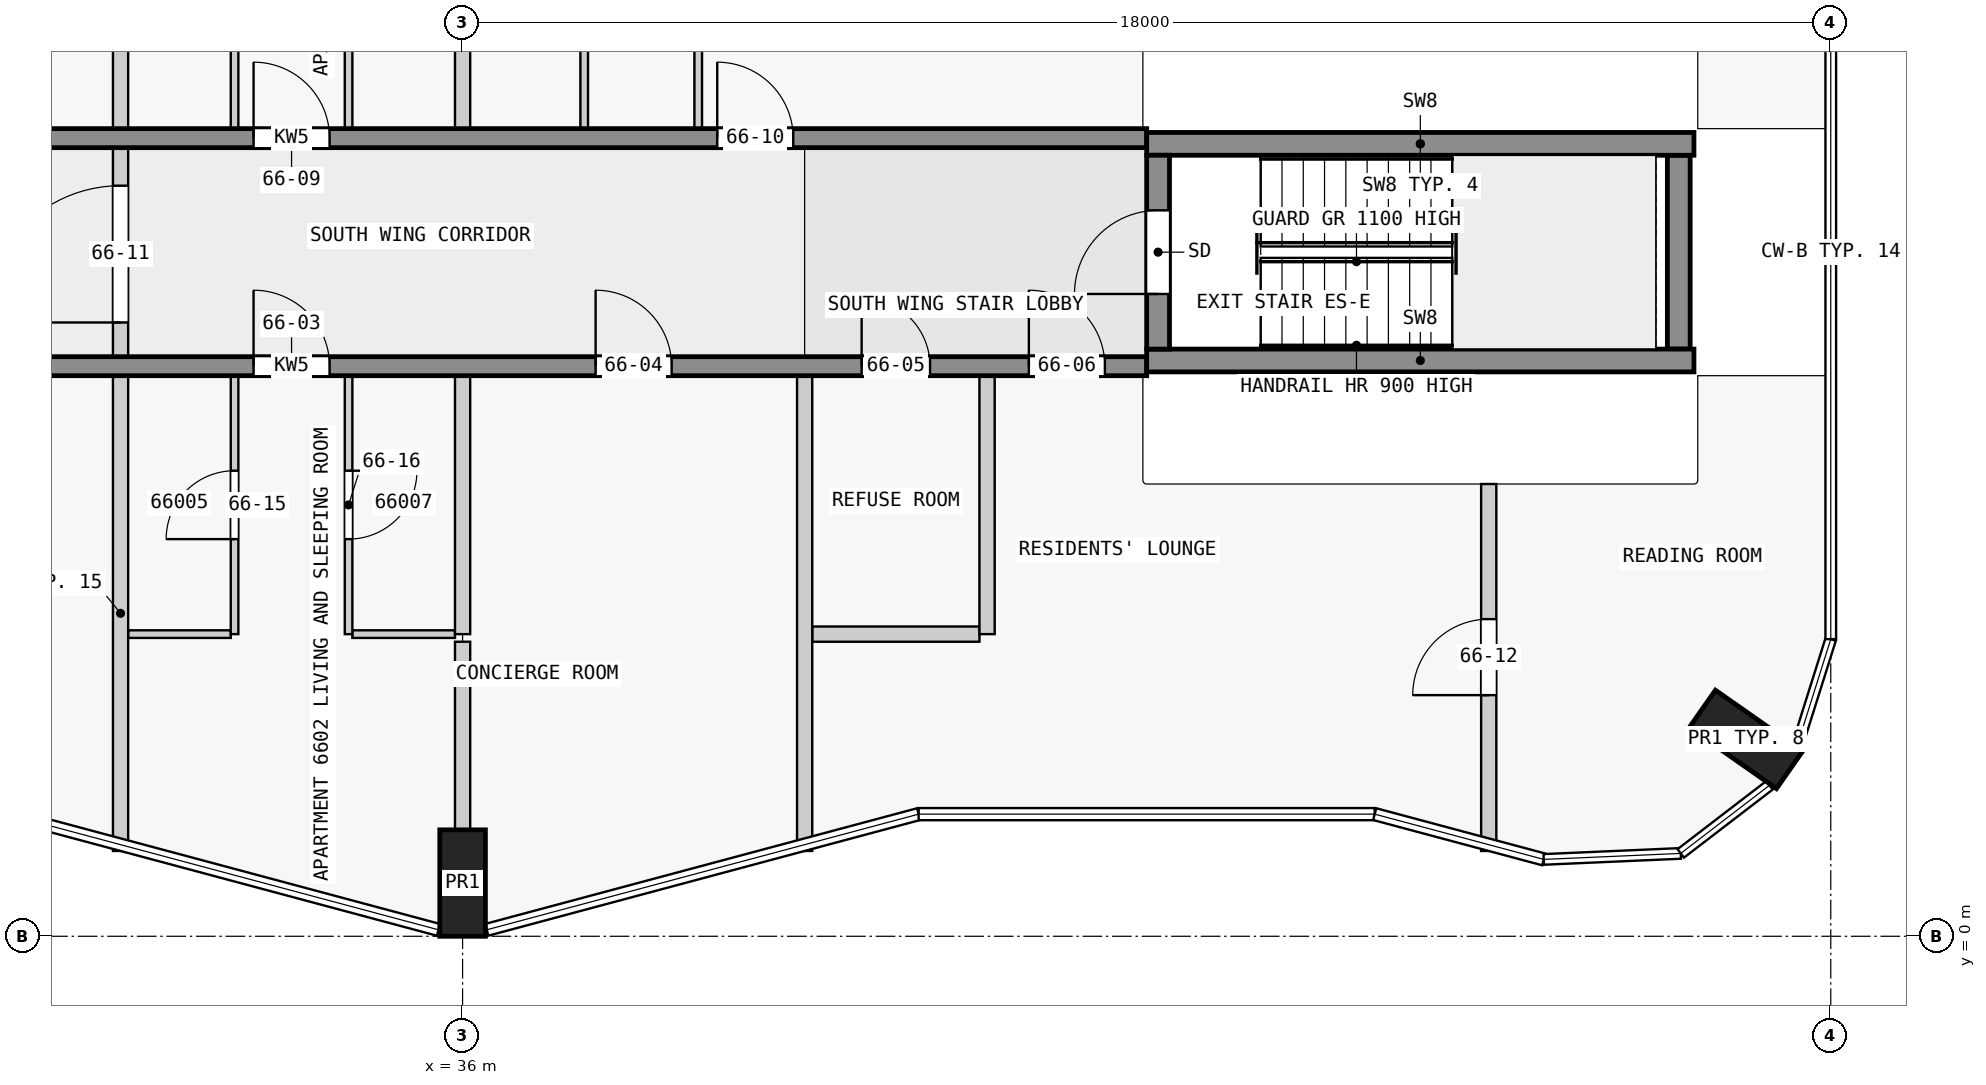
"""IFC4 building model, lengths in metres.
Left out: names, types, materials, properties, quantities, classifications, styles, units other than length and angle.
Written with IfcOpenShell. Run it as: python <this file> out.ifc"""

import sys

from ifc_helpers import new_model, si_unit, direction, frame, frame_2d, origin, origin_2d, place, context, subcontext, project, spatial, rectangle, extrude, element, fill, save


model = new_model("IFC4")
c1 = context("Model", 3, precision=1e-05, world=origin(), true_north=direction((0.0, 1.0)))
c2 = subcontext(c1, "Body", "Model", "MODEL_VIEW")
j1 = project(units=[si_unit("LENGTHUNIT", "METRE"), si_unit("PLANEANGLEUNIT", "RADIAN")], contexts=[c1])
p1 = place(None, origin())
s1 = spatial("IfcSite", under=j1, at=p1, CompositionType="ELEMENT")
p2 = place(p1, origin())
s2 = spatial("IfcBuilding", under=s1, at=p2, CompositionType="ELEMENT")
p3 = place(p2, frame((0.0, 0.0, 252.9)))
s3 = spatial("IfcBuildingStorey", under=s2, at=p3, CompositionType="ELEMENT", Elevation=252.9)
for number, where, z_axis, x_axis in (
    (1, (36.0, 0.7, 0.0), (0.0, 0.0, 1.0), (1.0, 0.0, 0.0)),
    (2, (52.884, 2.59, 0.0), (0.0, 0.0, 1.0), (0.574, 0.819, 0.0)),
):
    element("IfcColumn", number, at=place(p3, frame(where, z_axis=z_axis, x_axis=x_axis)), inside=s3, PredefinedType="COLUMN", context=c2, shape_type="SweptSolid", body=[
        extrude(rectangle(XDim=0.6, YDim=1.4, at=origin_2d()), origin(), (0.0, 0.0, 1.0), 3.5),
    ])
p4 = place(p3, frame((45.15, 7.725, 0.0), z_axis=(0.0, 0.0, 1.0), x_axis=(0.0, 1.0, 0.0)))
e3 = element("IfcWall", 3, at=p4, inside=s3, PredefinedType="SHEAR", context=c2, shape_type="SweptSolid", body=[
    extrude(rectangle(XDim=2.55, YDim=0.3, at=frame_2d((1.275, 0.0))), origin(), (0.0, 0.0, 1.0), 3.5),
])
p5 = place(p4, frame((0.725, 0.0, 0.0)))
e4 = element("IfcOpeningElement", 4, at=p5, cuts=e3, PredefinedType="OPENING", context=c2, shape_type="SweptSolid", body=[
    extrude(rectangle(XDim=1.1, YDim=2.1, at=frame_2d((0.55, 1.05))), frame((0.0, 0.16, 0.0), z_axis=(0.0, -1.0, 0.0), x_axis=(1.0, 0.0, 0.0)), (0.0, 0.0, 1.0), 0.32),
])
p6 = place(p3, frame((52.0, 7.725, 0.0), z_axis=(0.0, 0.0, 1.0), x_axis=(0.0, 1.0, 0.0)))
e5 = element("IfcWall", 5, at=p6, inside=s3, PredefinedType="SHEAR", context=c2, shape_type="SweptSolid", body=[
    extrude(rectangle(XDim=2.55, YDim=0.3, at=frame_2d((1.275, 0.0))), origin(), (0.0, 0.0, 1.0), 3.5),
])
for number, where, z_axis, x_axis in (
    (6, (45.0, 7.575, 0.0), (0.0, 0.0, 1.0), (1.0, 0.0, 0.0)),
    (7, (45.0, 10.425, 0.0), (0.0, 0.0, 1.0), (1.0, 0.0, 0.0)),
):
    element("IfcWall", number, at=place(p3, frame(where, z_axis=z_axis, x_axis=x_axis)), inside=s3, PredefinedType="SHEAR", context=c2, shape_type="SweptSolid", body=[
        extrude(rectangle(XDim=7.2, YDim=0.3, at=frame_2d((3.6, 0.0))), origin(), (0.0, 0.0, 1.0), 3.5),
    ])
p7 = place(p3, frame((22.5, 7.5, 0.0), z_axis=(0.0, 0.0, 1.0), x_axis=(1.0, 0.0, 0.0)))
e8 = element("IfcWall", 8, at=p7, inside=s3, PredefinedType="SHEAR", context=c2, shape_type="SweptSolid", body=[
    extrude(rectangle(XDim=22.5, YDim=0.25, at=frame_2d((11.25, 0.0))), origin(), (0.0, 0.0, 1.0), 3.25),
])
p8 = place(p7, frame((1.75, 0.0, 0.0)))
e9 = element("IfcOpeningElement", 9, at=p8, cuts=e8, PredefinedType="OPENING", context=c2, shape_type="SweptSolid", body=[
    extrude(rectangle(XDim=1.0, YDim=2.1, at=frame_2d((0.5, 1.05))), frame((0.0, 0.135, 0.0), z_axis=(0.0, -1.0, 0.0), x_axis=(1.0, 0.0, 0.0)), (0.0, 0.0, 1.0), 0.27),
])
p9 = place(p7, frame((5.85, 0.0, 0.0)))
e10 = element("IfcOpeningElement", 10, at=p9, cuts=e8, PredefinedType="OPENING", context=c2, shape_type="SweptSolid", body=[
    extrude(rectangle(XDim=1.8, YDim=2.1, at=frame_2d((0.9, 1.05))), frame((0.0, 0.135, 0.0), z_axis=(0.0, -1.0, 0.0), x_axis=(1.0, 0.0, 0.0)), (0.0, 0.0, 1.0), 0.27),
])
p10 = place(p7, frame((10.75, 0.0, 0.0)))
e11 = element("IfcOpeningElement", 11, at=p10, cuts=e8, PredefinedType="OPENING", context=c2, shape_type="SweptSolid", body=[
    extrude(rectangle(XDim=1.0, YDim=2.1, at=frame_2d((0.5, 1.05))), frame((0.0, 0.135, 0.0), z_axis=(0.0, -1.0, 0.0), x_axis=(1.0, 0.0, 0.0)), (0.0, 0.0, 1.0), 0.27),
])
p11 = place(p7, frame((15.25, 0.0, 0.0)))
e12 = element("IfcOpeningElement", 12, at=p11, cuts=e8, PredefinedType="OPENING", context=c2, shape_type="SweptSolid", body=[
    extrude(rectangle(XDim=1.0, YDim=2.1, at=frame_2d((0.5, 1.05))), frame((0.0, 0.135, 0.0), z_axis=(0.0, -1.0, 0.0), x_axis=(1.0, 0.0, 0.0)), (0.0, 0.0, 1.0), 0.27),
])
p12 = place(p7, frame((18.75, 0.0, 0.0)))
e13 = element("IfcOpeningElement", 13, at=p12, cuts=e8, PredefinedType="OPENING", context=c2, shape_type="SweptSolid", body=[
    extrude(rectangle(XDim=0.9, YDim=2.1, at=frame_2d((0.45, 1.05))), frame((0.0, 0.135, 0.0), z_axis=(0.0, -1.0, 0.0), x_axis=(1.0, 0.0, 0.0)), (0.0, 0.0, 1.0), 0.27),
])
p13 = place(p7, frame((20.95, 0.0, 0.0)))
e14 = element("IfcOpeningElement", 14, at=p13, cuts=e8, PredefinedType="OPENING", context=c2, shape_type="SweptSolid", body=[
    extrude(rectangle(XDim=1.0, YDim=2.1, at=frame_2d((0.5, 1.05))), frame((0.0, 0.135, 0.0), z_axis=(0.0, -1.0, 0.0), x_axis=(1.0, 0.0, 0.0)), (0.0, 0.0, 1.0), 0.27),
])
p14 = place(p3, frame((22.5, 10.5, 0.0), z_axis=(0.0, 0.0, 1.0), x_axis=(1.0, 0.0, 0.0)))
e15 = element("IfcWall", 15, at=p14, inside=s3, PredefinedType="SHEAR", context=c2, shape_type="SweptSolid", body=[
    extrude(rectangle(XDim=22.5, YDim=0.25, at=frame_2d((11.25, 0.0))), origin(), (0.0, 0.0, 1.0), 3.25),
])
p15 = place(p14, frame((1.75, 0.0, 0.0)))
e16 = element("IfcOpeningElement", 16, at=p15, cuts=e15, PredefinedType="OPENING", context=c2, shape_type="SweptSolid", body=[
    extrude(rectangle(XDim=1.0, YDim=2.1, at=frame_2d((0.5, 1.05))), frame((0.0, 0.135, 0.0), z_axis=(0.0, -1.0, 0.0), x_axis=(1.0, 0.0, 0.0)), (0.0, 0.0, 1.0), 0.27),
])
p16 = place(p14, frame((6.25, 0.0, 0.0)))
e17 = element("IfcOpeningElement", 17, at=p16, cuts=e15, PredefinedType="OPENING", context=c2, shape_type="SweptSolid", body=[
    extrude(rectangle(XDim=1.0, YDim=2.1, at=frame_2d((0.5, 1.05))), frame((0.0, 0.135, 0.0), z_axis=(0.0, -1.0, 0.0), x_axis=(1.0, 0.0, 0.0)), (0.0, 0.0, 1.0), 0.27),
])
p17 = place(p14, frame((10.75, 0.0, 0.0)))
e18 = element("IfcOpeningElement", 18, at=p17, cuts=e15, PredefinedType="OPENING", context=c2, shape_type="SweptSolid", body=[
    extrude(rectangle(XDim=1.0, YDim=2.1, at=frame_2d((0.5, 1.05))), frame((0.0, 0.135, 0.0), z_axis=(0.0, -1.0, 0.0), x_axis=(1.0, 0.0, 0.0)), (0.0, 0.0, 1.0), 0.27),
])
p18 = place(p14, frame((16.85, 0.0, 0.0)))
e19 = element("IfcOpeningElement", 19, at=p18, cuts=e15, PredefinedType="OPENING", context=c2, shape_type="SweptSolid", body=[
    extrude(rectangle(XDim=1.0, YDim=2.1, at=frame_2d((0.5, 1.05))), frame((0.0, 0.135, 0.0), z_axis=(0.0, -1.0, 0.0), x_axis=(1.0, 0.0, 0.0)), (0.0, 0.0, 1.0), 0.27),
])
for number, where, z_axis, x_axis in (
    (20, (31.6, 3.975, 0.0), (0.0, 0.0, 1.0), (1.0, 0.0, 0.0)),
    (21, (34.55, 3.975, 0.0), (0.0, 0.0, 1.0), (1.0, 0.0, 0.0)),
):
    element("IfcWall", number, at=place(p3, frame(where, z_axis=z_axis, x_axis=x_axis)), inside=s3, PredefinedType="PARTITIONING", context=c2, shape_type="SweptSolid", body=[
        extrude(rectangle(XDim=1.35, YDim=0.1, at=frame_2d((0.675, 0.0))), origin(), (0.0, 0.0, 1.0), 3.25),
    ])
p19 = place(p3, frame((40.6, 3.975, 0.0), z_axis=(0.0, 0.0, 1.0), x_axis=(1.0, 0.0, 0.0)))
e22 = element("IfcWall", 22, at=p19, inside=s3, PredefinedType="PARTITIONING", context=c2, shape_type="SweptSolid", body=[
    extrude(rectangle(XDim=2.2, YDim=0.2, at=frame_2d((1.1, 0.0))), origin(), (0.0, 0.0, 1.0), 3.25),
])
for number, where, z_axis, x_axis in (
    (23, (31.5, 1.122, 0.0), (0.0, 0.0, 1.0), (0.0, 1.0, 0.0)),
    (24, (31.5, 10.625, 0.0), (0.0, 0.0, 1.0), (0.0, 1.0, 0.0)),
):
    element("IfcWall", number, at=place(p3, frame(where, z_axis=z_axis, x_axis=x_axis)), inside=s3, PredefinedType="PARTITIONING", context=c2, shape_type="SweptSolid", body=[
        extrude(rectangle(XDim=6.253, YDim=0.2, at=frame_2d((3.126, 0.0))), origin(), (0.0, 0.0, 1.0), 3.25),
    ])
p20 = place(p3, frame((33.0, 3.975, 0.0), z_axis=(0.0, 0.0, 1.0), x_axis=(0.0, 1.0, 0.0)))
e25 = element("IfcWall", 25, at=p20, inside=s3, PredefinedType="PARTITIONING", context=c2, shape_type="SweptSolid", body=[
    extrude(rectangle(XDim=3.4, YDim=0.1, at=frame_2d((1.7, 0.0))), origin(), (0.0, 0.0, 1.0), 3.25),
])
p21 = place(p20, frame((1.25, 0.0, 0.0)))
e26 = element("IfcOpeningElement", 26, at=p21, cuts=e25, PredefinedType="OPENING", context=c2, shape_type="SweptSolid", body=[
    extrude(rectangle(XDim=0.9, YDim=2.1, at=frame_2d((0.45, 1.05))), frame((0.0, 0.06, 0.0), z_axis=(0.0, -1.0, 0.0), x_axis=(1.0, 0.0, 0.0)), (0.0, 0.0, 1.0), 0.12),
])
p22 = place(p3, frame((33.0, 10.625, 0.0), z_axis=(0.0, 0.0, 1.0), x_axis=(0.0, 1.0, 0.0)))
e27 = element("IfcWall", 27, at=p22, inside=s3, PredefinedType="PARTITIONING", context=c2, shape_type="SweptSolid", body=[
    extrude(rectangle(XDim=3.4, YDim=0.1, at=frame_2d((1.7, 0.0))), origin(), (0.0, 0.0, 1.0), 3.25),
])
p23 = place(p22, frame((1.25, 0.0, 0.0)))
e28 = element("IfcOpeningElement", 28, at=p23, cuts=e27, PredefinedType="OPENING", context=c2, shape_type="SweptSolid", body=[
    extrude(rectangle(XDim=0.9, YDim=2.1, at=frame_2d((0.45, 1.05))), frame((0.0, 0.06, 0.0), z_axis=(0.0, -1.0, 0.0), x_axis=(1.0, 0.0, 0.0)), (0.0, 0.0, 1.0), 0.12),
])
p24 = place(p3, frame((34.5, 7.375, 0.0), z_axis=(0.0, 0.0, 1.0), x_axis=(0.0, -1.0, 0.0)))
e29 = element("IfcWall", 29, at=p24, inside=s3, PredefinedType="PARTITIONING", context=c2, shape_type="SweptSolid", body=[
    extrude(rectangle(XDim=3.4, YDim=0.1, at=frame_2d((1.7, 0.0))), origin(), (0.0, 0.0, 1.0), 3.25),
])
p25 = place(p24, frame((1.25, 0.0, 0.0)))
e30 = element("IfcOpeningElement", 30, at=p25, cuts=e29, PredefinedType="OPENING", context=c2, shape_type="SweptSolid", body=[
    extrude(rectangle(XDim=0.9, YDim=2.1, at=frame_2d((0.45, 1.05))), frame((0.0, 0.06, 0.0), z_axis=(0.0, -1.0, 0.0), x_axis=(1.0, 0.0, 0.0)), (0.0, 0.0, 1.0), 0.12),
])
p26 = place(p3, frame((34.5, 13.975, 0.0), z_axis=(0.0, 0.0, 1.0), x_axis=(0.0, -1.0, 0.0)))
e31 = element("IfcWall", 31, at=p26, inside=s3, PredefinedType="PARTITIONING", context=c2, shape_type="SweptSolid", body=[
    extrude(rectangle(XDim=3.35, YDim=0.1, at=frame_2d((1.675, 0.0))), origin(), (0.0, 0.0, 1.0), 3.25),
])
p27 = place(p26, frame((1.25, 0.0, 0.0)))
e32 = element("IfcOpeningElement", 32, at=p27, cuts=e31, PredefinedType="OPENING", context=c2, shape_type="SweptSolid", body=[
    extrude(rectangle(XDim=0.9, YDim=2.1, at=frame_2d((0.45, 1.05))), frame((0.0, 0.06, 0.0), z_axis=(0.0, -1.0, 0.0), x_axis=(1.0, 0.0, 0.0)), (0.0, 0.0, 1.0), 0.12),
])
p28 = place(p3, frame((36.0, 3.875, 0.0), z_axis=(0.0, 0.0, 1.0), x_axis=(0.0, -1.0, 0.0)))
e33 = element("IfcWall", 33, at=p28, inside=s3, PredefinedType="PARTITIONING", context=c2, shape_type="SweptSolid", body=[
    extrude(rectangle(XDim=2.475, YDim=0.2, at=frame_2d((1.238, 0.0))), origin(), (0.0, 0.0, 1.0), 3.25),
])
for number, where, z_axis, x_axis in (
    (34, (36.0, 3.975, 0.0), (0.0, 0.0, 1.0), (0.0, 1.0, 0.0)),
    (35, (36.0, 10.625, 0.0), (0.0, 0.0, 1.0), (0.0, 1.0, 0.0)),
):
    element("IfcWall", number, at=place(p3, frame(where, z_axis=z_axis, x_axis=x_axis)), inside=s3, PredefinedType="PARTITIONING", context=c2, shape_type="SweptSolid", body=[
        extrude(rectangle(XDim=3.4, YDim=0.2, at=frame_2d((1.7, 0.0))), origin(), (0.0, 0.0, 1.0), 3.25),
    ])
p29 = place(p3, frame((37.6, 10.625, 0.0), z_axis=(0.0, 0.0, 1.0), x_axis=(0.0, 1.0, 0.0)))
e36 = element("IfcWall", 36, at=p29, inside=s3, PredefinedType="PARTITIONING", context=c2, shape_type="SweptSolid", body=[
    extrude(rectangle(XDim=3.35, YDim=0.1, at=frame_2d((1.675, 0.0))), origin(), (0.0, 0.0, 1.0), 3.25),
])
p30 = place(p3, frame((39.1, 10.625, 0.0), z_axis=(0.0, 0.0, 1.0), x_axis=(0.0, 1.0, 0.0)))
e37 = element("IfcWall", 37, at=p30, inside=s3, PredefinedType="PARTITIONING", context=c2, shape_type="SweptSolid", body=[
    extrude(rectangle(XDim=3.35, YDim=0.1, at=frame_2d((1.675, 0.0))), origin(), (0.0, 0.0, 1.0), 3.25),
])
p31 = place(p30, frame((1.25, 0.0, 0.0)))
e38 = element("IfcOpeningElement", 38, at=p31, cuts=e37, PredefinedType="OPENING", context=c2, shape_type="SweptSolid", body=[
    extrude(rectangle(XDim=0.9, YDim=2.1, at=frame_2d((0.45, 1.05))), frame((0.0, 0.06, 0.0), z_axis=(0.0, -1.0, 0.0), x_axis=(1.0, 0.0, 0.0)), (0.0, 0.0, 1.0), 0.12),
])
p32 = place(p3, frame((40.5, 1.122, 0.0), z_axis=(0.0, 0.0, 1.0), x_axis=(0.0, 1.0, 0.0)))
e39 = element("IfcWall", 39, at=p32, inside=s3, PredefinedType="PARTITIONING", context=c2, shape_type="SweptSolid", body=[
    extrude(rectangle(XDim=6.253, YDim=0.2, at=frame_2d((3.126, 0.0))), origin(), (0.0, 0.0, 1.0), 3.25),
])
p33 = place(p3, frame((42.9, 3.975, 0.0), z_axis=(0.0, 0.0, 1.0), x_axis=(0.0, 1.0, 0.0)))
e40 = element("IfcWall", 40, at=p33, inside=s3, PredefinedType="PARTITIONING", context=c2, shape_type="SweptSolid", body=[
    extrude(rectangle(XDim=3.4, YDim=0.2, at=frame_2d((1.7, 0.0))), origin(), (0.0, 0.0, 1.0), 3.25),
])
p34 = place(p3, frame((49.5, 1.122, 0.0), z_axis=(0.0, 0.0, 1.0), x_axis=(0.0, 1.0, 0.0)))
e41 = element("IfcWall", 41, at=p34, inside=s3, PredefinedType="PARTITIONING", context=c2, shape_type="SweptSolid", body=[
    extrude(rectangle(XDim=4.828, YDim=0.2, at=frame_2d((2.414, 0.0))), origin(), (0.0, 0.0, 1.0), 3.25),
])
p35 = place(p34, frame((2.05, 0.0, 0.0)))
e42 = element("IfcOpeningElement", 42, at=p35, cuts=e41, PredefinedType="OPENING", context=c2, shape_type="SweptSolid", body=[
    extrude(rectangle(XDim=1.0, YDim=2.1, at=frame_2d((0.5, 1.05))), frame((0.0, 0.11, 0.0), z_axis=(0.0, -1.0, 0.0), x_axis=(1.0, 0.0, 0.0)), (0.0, 0.0, 1.0), 0.22),
])
p36 = place(p3, frame((31.5, 7.475, 0.0), z_axis=(0.0, 0.0, 1.0), x_axis=(0.0, 1.0, 0.0)))
e43 = element("IfcWall", 43, at=p36, inside=s3, PredefinedType="PARTITIONING", context=c2, shape_type="SweptSolid", body=[
    extrude(rectangle(XDim=3.05, YDim=0.2, at=frame_2d((1.525, 0.0))), origin(), (0.0, 0.0, 1.0), 3.25),
])
p37 = place(p36, frame((0.6, 0.0, 0.0)))
e44 = element("IfcOpeningElement", 44, at=p37, cuts=e43, PredefinedType="OPENING", context=c2, shape_type="SweptSolid", body=[
    extrude(rectangle(XDim=1.8, YDim=2.1, at=frame_2d((0.9, 1.05))), frame((0.0, 0.11, 0.0), z_axis=(0.0, -1.0, 0.0), x_axis=(1.0, 0.0, 0.0)), (0.0, 0.0, 1.0), 0.22),
])
p38 = place(p5, origin())
e45 = element("IfcDoor", 45, at=p38, inside=s3, OperationType="SINGLE_SWING_LEFT", PredefinedType="DOOR", context=c2, shape_type="SweptSolid", body=[
    extrude(rectangle(XDim=1.1, YDim=2.1, at=frame_2d((0.55, 1.05))), frame((0.0, 0.025, 0.0), z_axis=(0.0, -1.0, 0.0), x_axis=(1.0, 0.0, 0.0)), (0.0, 0.0, 1.0), 0.05),
])
fill(e4, e45)
p39 = place(p10, origin())
e46 = element("IfcDoor", 46, at=p39, inside=s3, OperationType="SINGLE_SWING_LEFT", PredefinedType="DOOR", context=c2, shape_type="SweptSolid", body=[
    extrude(rectangle(XDim=1.0, YDim=2.1, at=frame_2d((0.5, 1.05))), frame((0.0, 0.025, 0.0), z_axis=(0.0, -1.0, 0.0), x_axis=(1.0, 0.0, 0.0)), (0.0, 0.0, 1.0), 0.05),
])
fill(e11, e46)
p40 = place(p11, origin())
e47 = element("IfcDoor", 47, at=p40, inside=s3, OperationType="SINGLE_SWING_RIGHT", PredefinedType="DOOR", context=c2, shape_type="SweptSolid", body=[
    extrude(rectangle(XDim=1.0, YDim=2.1, at=frame_2d((0.5, 1.05))), frame((0.0, 0.025, 0.0), z_axis=(0.0, -1.0, 0.0), x_axis=(1.0, 0.0, 0.0)), (0.0, 0.0, 1.0), 0.05),
])
fill(e12, e47)
p41 = place(p12, origin())
e48 = element("IfcDoor", 48, at=p41, inside=s3, OperationType="SINGLE_SWING_RIGHT", PredefinedType="DOOR", context=c2, shape_type="SweptSolid", body=[
    extrude(rectangle(XDim=0.9, YDim=2.1, at=frame_2d((0.45, 1.05))), frame((0.0, 0.025, 0.0), z_axis=(0.0, -1.0, 0.0), x_axis=(1.0, 0.0, 0.0)), (0.0, 0.0, 1.0), 0.05),
])
fill(e13, e48)
p42 = place(p13, origin())
e49 = element("IfcDoor", 49, at=p42, inside=s3, OperationType="SINGLE_SWING_RIGHT", PredefinedType="DOOR", context=c2, shape_type="SweptSolid", body=[
    extrude(rectangle(XDim=1.0, YDim=2.1, at=frame_2d((0.5, 1.05))), frame((0.0, 0.025, 0.0), z_axis=(0.0, -1.0, 0.0), x_axis=(1.0, 0.0, 0.0)), (0.0, 0.0, 1.0), 0.05),
])
fill(e14, e49)
p43 = place(p17, origin())
e50 = element("IfcDoor", 50, at=p43, inside=s3, OperationType="SINGLE_SWING_LEFT", PredefinedType="DOOR", context=c2, shape_type="SweptSolid", body=[
    extrude(rectangle(XDim=1.0, YDim=2.1, at=frame_2d((0.5, 1.05))), frame((0.0, 0.025, 0.0), z_axis=(0.0, -1.0, 0.0), x_axis=(1.0, 0.0, 0.0)), (0.0, 0.0, 1.0), 0.05),
])
fill(e18, e50)
p44 = place(p18, origin())
e51 = element("IfcDoor", 51, at=p44, inside=s3, OperationType="SINGLE_SWING_RIGHT", PredefinedType="DOOR", context=c2, shape_type="SweptSolid", body=[
    extrude(rectangle(XDim=1.0, YDim=2.1, at=frame_2d((0.5, 1.05))), frame((0.0, 0.025, 0.0), z_axis=(0.0, -1.0, 0.0), x_axis=(1.0, 0.0, 0.0)), (0.0, 0.0, 1.0), 0.05),
])
fill(e19, e51)
p45 = place(p37, origin())
e52 = element("IfcDoor", 52, at=p45, inside=s3, OperationType="SINGLE_SWING_LEFT", PredefinedType="DOOR", context=c2, shape_type="SweptSolid", body=[
    extrude(rectangle(XDim=1.8, YDim=2.1, at=frame_2d((0.9, 1.05))), frame((0.0, 0.025, 0.0), z_axis=(0.0, -1.0, 0.0), x_axis=(1.0, 0.0, 0.0)), (0.0, 0.0, 1.0), 0.05),
])
fill(e44, e52)
p46 = place(p35, origin())
e53 = element("IfcDoor", 53, at=p46, inside=s3, OperationType="SINGLE_SWING_RIGHT", PredefinedType="DOOR", context=c2, shape_type="SweptSolid", body=[
    extrude(rectangle(XDim=1.0, YDim=2.1, at=frame_2d((0.5, 1.05))), frame((0.0, 0.025, 0.0), z_axis=(0.0, -1.0, 0.0), x_axis=(1.0, 0.0, 0.0)), (0.0, 0.0, 1.0), 0.05),
])
fill(e42, e53)
p47 = place(p21, origin())
e54 = element("IfcDoor", 54, at=p47, inside=s3, OperationType="SINGLE_SWING_LEFT", PredefinedType="DOOR", context=c2, shape_type="SweptSolid", body=[
    extrude(rectangle(XDim=0.9, YDim=2.1, at=frame_2d((0.45, 1.05))), frame((0.0, 0.025, 0.0), z_axis=(0.0, -1.0, 0.0), x_axis=(1.0, 0.0, 0.0)), (0.0, 0.0, 1.0), 0.05),
])
fill(e26, e54)
p48 = place(p25, origin())
e55 = element("IfcDoor", 55, at=p48, inside=s3, OperationType="SINGLE_SWING_LEFT", PredefinedType="DOOR", context=c2, shape_type="SweptSolid", body=[
    extrude(rectangle(XDim=0.9, YDim=2.1, at=frame_2d((0.45, 1.05))), frame((0.0, 0.025, 0.0), z_axis=(0.0, -1.0, 0.0), x_axis=(1.0, 0.0, 0.0)), (0.0, 0.0, 1.0), 0.05),
])
fill(e30, e55)
save(model, sys.argv[1])
